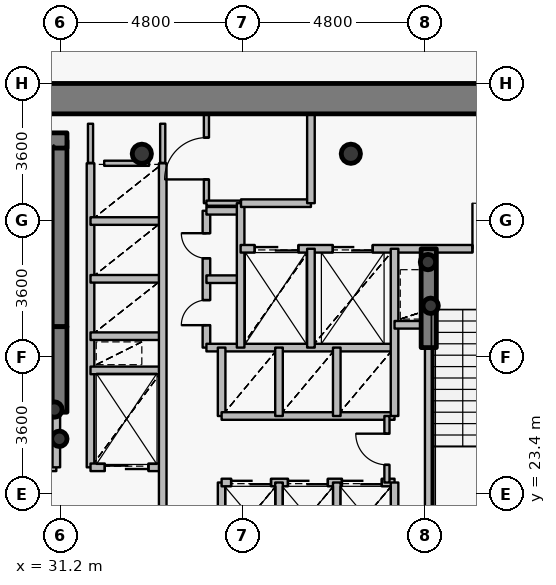
"""IFC4 building model, lengths in metres.
Left out: names, types, materials, properties, quantities, classifications, styles, units other than length and angle.
Written with IfcOpenShell. Run it as: python <this file> out.ifc"""

import sys

from ifc_helpers import new_model, si_unit, direction, frame, frame_2d, origin, origin_2d, place, context, subcontext, project, spatial, rectangle, hollow_circle, extrude, source, transform, mapped, element, fill, save


model = new_model("IFC4")
c1 = context("Model", 3, precision=1e-05, world=origin(), true_north=direction((0.0, 1.0)))
c2 = subcontext(c1, "Body", "Model", "MODEL_VIEW")
j1 = project(units=[si_unit("LENGTHUNIT", "METRE"), si_unit("PLANEANGLEUNIT", "RADIAN")], contexts=[c1])
p1 = place(None, origin())
s1 = spatial("IfcSite", under=j1, at=p1, CompositionType="ELEMENT")
p2 = place(p1, origin())
s2 = spatial("IfcBuilding", under=s1, at=p2, CompositionType="ELEMENT")
p3 = place(p2, frame((0.0, 0.0, 112.2)))
s3 = spatial("IfcBuildingStorey", under=s2, at=p3, CompositionType="ELEMENT", Elevation=112.2)
for number, where, z_axis, x_axis in (
    (1, (38.85, 32.35, 0.0), (0.0, 0.0, 1.0), (1.0, 0.0, 0.0)),
    (2, (33.35, 32.35, 0.0), (0.0, 0.0, 1.0), (1.0, 0.0, 0.0)),
):
    element("IfcColumn", number, at=place(p3, frame(where, z_axis=z_axis, x_axis=x_axis)), inside=s3, PredefinedType="COLUMN", context=c2, shape_type="SweptSolid", body=[
        extrude(hollow_circle(Radius=0.254, WallThickness=0.02, at=origin_2d()), origin(), (0.0, 0.0, 1.0), 3.75),
    ])
p4 = place(p3, frame((31.18, 27.8, 0.0), z_axis=(0.0, 0.0, 1.0), x_axis=(0.0, 1.0, 0.0)))
e3 = element("IfcWall", 3, at=p4, inside=s3, PredefinedType="SHEAR", context=c2, shape_type="SweptSolid", body=[
    extrude(rectangle(XDim=4.9, YDim=0.4, at=frame_2d((2.45, 0.0))), origin(), (0.0, 0.0, 1.0), 3.75),
])
p5 = place(p3, frame((27.28, 32.7, 0.0), z_axis=(0.0, 0.0, 1.0), x_axis=(1.0, 0.0, 0.0)))
e4 = element("IfcWall", 4, at=p5, inside=s3, PredefinedType="SHEAR", context=c2, shape_type="SweptSolid", body=[
    extrude(rectangle(XDim=4.1, YDim=0.4, at=frame_2d((2.05, 0.0))), origin(), (0.0, 0.0, 1.0), 3.75),
])
for number, where, z_axis, x_axis in (
    (5, (31.05, 25.62, 0.0), (0.0, 0.0, 1.0), (1.0, 0.0, 0.0)),
    (6, (31.18, 24.85, 0.0), (0.0, 0.0, 1.0), (1.0, 0.0, 0.0)),
    (7, (40.95, 28.35, 0.0), (0.0, 0.0, 1.0), (1.0, 0.0, 0.0)),
    (8, (40.88, 29.5, 0.0), (0.0, 0.0, 1.0), (1.0, 0.0, 0.0)),
):
    element("IfcColumn", number, at=place(p3, frame(where, z_axis=z_axis, x_axis=x_axis)), inside=s3, PredefinedType="COLUMN", context=c2, shape_type="SweptSolid", body=[
        extrude(hollow_circle(Radius=0.203, WallThickness=0.016, at=origin_2d()), origin(), (0.0, 0.0, 1.0), 3.75),
    ])
p6 = place(p3, frame((26.6, 33.8, 0.0), z_axis=(0.0, 0.0, 1.0), x_axis=(1.0, 0.0, 0.0)))
e9 = element("IfcWall", 9, at=p6, inside=s3, PredefinedType="SHEAR", context=c2, shape_type="SweptSolid", body=[
    extrude(rectangle(XDim=18.8, YDim=0.8, at=frame_2d((9.4, 0.0))), origin(), (0.0, 0.0, 1.0), 2.95),
])
p7 = place(p3, frame((31.18, 25.55, 0.0), z_axis=(0.0, 0.0, 1.0), x_axis=(0.0, 1.0, 0.0)))
e10 = element("IfcWall", 10, at=p7, inside=s3, PredefinedType="SHEAR", context=c2, shape_type="SweptSolid", body=[
    extrude(rectangle(XDim=2.25, YDim=0.4, at=frame_2d((1.125, 0.0))), origin(), (0.0, 0.0, 1.0), 3.1),
])
p8 = place(p3, frame((40.9, 27.25, 0.0), z_axis=(0.0, 0.0, 1.0), x_axis=(0.0, 1.0, 0.0)))
e11 = element("IfcWall", 11, at=p8, inside=s3, PredefinedType="SHEAR", context=c2, shape_type="SweptSolid", body=[
    extrude(rectangle(XDim=2.6, YDim=0.4, at=frame_2d((1.3, 0.0))), origin(), (0.0, 0.0, 1.0), 3.1),
])
p9 = place(p3, frame((27.56, 24.1, 0.0), z_axis=(0.0, 0.0, 1.0), x_axis=(1.0, 0.0, 0.0)))
e12 = element("IfcWall", 12, at=p9, inside=s3, PredefinedType="PARTITIONING", context=c2, shape_type="SweptSolid", body=[
    extrude(rectangle(XDim=3.54, YDim=0.2, at=frame_2d((1.77, 0.0))), origin(), (0.0, 0.0, 1.0), 3.5),
])
p10 = place(p9, frame((1.17, 0.0, 0.0)))
e13 = element("IfcOpeningElement", 13, at=p10, cuts=e12, PredefinedType="OPENING", context=c2, shape_type="SweptSolid", body=[
    extrude(rectangle(XDim=1.2, YDim=2.15, at=origin_2d()), frame((0.6, 0.11, 1.075), z_axis=(0.0, -1.0, 0.0), x_axis=(1.0, 0.0, 0.0)), (0.0, 0.0, 1.0), 0.22),
])
p11 = place(p3, frame((31.1, 24.1, 0.0), z_axis=(0.0, 0.0, 1.0), x_axis=(0.0, 1.0, 0.0)))
e14 = element("IfcWall", 14, at=p11, inside=s3, PredefinedType="PARTITIONING", context=c2, shape_type="SweptSolid", body=[
    extrude(rectangle(XDim=1.44, YDim=0.2, at=frame_2d((0.72, 0.0))), origin(), (0.0, 0.0, 1.0), 3.5),
])
p12 = place(p3, frame((32.0, 24.1, 0.0), z_axis=(0.0, 0.0, 1.0), x_axis=(0.0, 1.0, 0.0)))
e15 = element("IfcWall", 15, at=p12, inside=s3, PredefinedType="PARTITIONING", context=c2, shape_type="SweptSolid", body=[
    extrude(rectangle(XDim=8.0, YDim=0.2, at=frame_2d((4.0, 0.0))), origin(), (0.0, 0.0, 1.0), 3.5),
])
p13 = place(p3, frame((32.0, 24.1, 0.0), z_axis=(0.0, 0.0, 1.0), x_axis=(1.0, 0.0, 0.0)))
e16 = element("IfcWall", 16, at=p13, inside=s3, PredefinedType="PARTITIONING", context=c2, shape_type="SweptSolid", body=[
    extrude(rectangle(XDim=1.9, YDim=0.2, at=frame_2d((0.95, 0.0))), origin(), (0.0, 0.0, 1.0), 3.085),
])
p14 = place(p13, frame((0.375, 0.0, 0.0)))
e17 = element("IfcOpeningElement", 17, at=p14, cuts=e16, PredefinedType="OPENING", context=c2, shape_type="SweptSolid", body=[
    extrude(rectangle(XDim=1.15, YDim=2.15, at=origin_2d()), frame((0.575, 0.11, 1.075), z_axis=(0.0, -1.0, 0.0), x_axis=(1.0, 0.0, 0.0)), (0.0, 0.0, 1.0), 0.22),
])
for number, where, z_axis, x_axis in (
    (18, (32.0, 26.65, 0.0), (0.0, 0.0, 1.0), (1.0, 0.0, 0.0)),
    (19, (32.0, 27.55, 0.0), (0.0, 0.0, 1.0), (1.0, 0.0, 0.0)),
    (20, (32.0, 29.06, 0.0), (0.0, 0.0, 1.0), (1.0, 0.0, 0.0)),
    (21, (32.0, 30.58, 0.0), (0.0, 0.0, 1.0), (1.0, 0.0, 0.0)),
):
    element("IfcWall", number, at=place(p3, frame(where, z_axis=z_axis, x_axis=x_axis)), inside=s3, PredefinedType="PARTITIONING", context=c2, shape_type="SweptSolid", body=[
        extrude(rectangle(XDim=1.9, YDim=0.2, at=frame_2d((0.95, 0.0))), origin(), (0.0, 0.0, 1.0), 3.085),
    ])
p15 = place(p3, frame((33.9, 20.6, 0.0), z_axis=(0.0, 0.0, 1.0), x_axis=(0.0, 1.0, 0.0)))
e22 = element("IfcWall", 22, at=p15, inside=s3, PredefinedType="PARTITIONING", context=c2, shape_type="SweptSolid", body=[
    extrude(rectangle(XDim=11.5, YDim=0.2, at=frame_2d((5.75, 0.0))), origin(), (0.0, 0.0, 1.0), 3.085),
])
p16 = place(p3, frame((35.05, 27.25, 0.0), z_axis=(0.0, 0.0, 1.0), x_axis=(0.0, 1.0, 0.0)))
e23 = element("IfcWall", 23, at=p16, inside=s3, PredefinedType="PARTITIONING", context=c2, shape_type="SweptSolid", body=[
    extrude(rectangle(XDim=3.6, YDim=0.2, at=frame_2d((1.8, 0.0))), origin(), (0.0, 0.0, 1.0), 3.5),
])
p17 = place(p16, frame((0.59, 0.0, 0.0)))
e24 = element("IfcOpeningElement", 24, at=p17, cuts=e23, PredefinedType="OPENING", context=c2, shape_type="SweptSolid", body=[
    extrude(rectangle(XDim=0.66, YDim=2.05, at=origin_2d()), frame((0.33, 0.11, 1.025), z_axis=(0.0, -1.0, 0.0), x_axis=(1.0, 0.0, 0.0)), (0.0, 0.0, 1.0), 0.22),
])
p18 = place(p16, frame((2.35, 0.0, 0.0)))
e25 = element("IfcOpeningElement", 25, at=p18, cuts=e23, PredefinedType="OPENING", context=c2, shape_type="SweptSolid", body=[
    extrude(rectangle(XDim=0.66, YDim=2.05, at=origin_2d()), frame((0.33, 0.11, 1.025), z_axis=(0.0, -1.0, 0.0), x_axis=(1.0, 0.0, 0.0)), (0.0, 0.0, 1.0), 0.22),
])
p19 = place(p3, frame((35.05, 27.25, 0.0), z_axis=(0.0, 0.0, 1.0), x_axis=(1.0, 0.0, 0.0)))
e26 = element("IfcWall", 26, at=p19, inside=s3, PredefinedType="PARTITIONING", context=c2, shape_type="SweptSolid", body=[
    extrude(rectangle(XDim=4.95, YDim=0.2, at=frame_2d((2.475, 0.0))), origin(), (0.0, 0.0, 1.0), 3.085),
])
for number, where, z_axis, x_axis in (
    (27, (35.05, 29.05, 0.0), (0.0, 0.0, 1.0), (1.0, 0.0, 0.0)),
    (28, (35.05, 30.85, 0.0), (0.0, 0.0, 1.0), (1.0, 0.0, 0.0)),
):
    element("IfcWall", number, at=place(p3, frame(where, z_axis=z_axis, x_axis=x_axis)), inside=s3, PredefinedType="PARTITIONING", context=c2, shape_type="SweptSolid", body=[
        extrude(rectangle(XDim=0.9, YDim=0.2, at=frame_2d((0.45, 0.0))), origin(), (0.0, 0.0, 1.0), 3.5),
    ])
p20 = place(p3, frame((35.05, 31.05, 0.0), z_axis=(0.0, 0.0, 1.0), x_axis=(0.0, 1.0, 0.0)))
e29 = element("IfcWall", 29, at=p20, inside=s3, PredefinedType="PARTITIONING", context=c2, shape_type="SweptSolid", body=[
    extrude(rectangle(XDim=2.35, YDim=0.135, at=frame_2d((1.175, 0.0))), origin(), (0.0, 0.0, 1.0), 3.085),
])
p21 = place(p20, frame((0.625, 0.0, 0.0)))
e30 = element("IfcOpeningElement", 30, at=p21, cuts=e29, PredefinedType="OPENING", context=c2, shape_type="SweptSolid", body=[
    extrude(rectangle(XDim=1.1, YDim=2.15, at=origin_2d()), frame((0.55, 0.078, 1.075), z_axis=(0.0, -1.0, 0.0), x_axis=(1.0, 0.0, 0.0)), (0.0, 0.0, 1.0), 0.155),
])
p22 = place(p3, frame((35.05, 31.05, 0.0), z_axis=(0.0, 0.0, 1.0), x_axis=(1.0, 0.0, 0.0)))
e31 = element("IfcWall", 31, at=p22, inside=s3, PredefinedType="PARTITIONING", context=c2, shape_type="SweptSolid", body=[
    extrude(rectangle(XDim=0.9, YDim=0.135, at=frame_2d((0.45, 0.0))), origin(), (0.0, 0.0, 1.0), 3.5),
])
p23 = place(p3, frame((35.45, 21.9, 0.0), z_axis=(0.0, 0.0, 1.0), x_axis=(0.0, 1.0, 0.0)))
e32 = element("IfcWall", 32, at=p23, inside=s3, PredefinedType="PARTITIONING", context=c2, shape_type="SweptSolid", body=[
    extrude(rectangle(XDim=1.8, YDim=0.2, at=frame_2d((0.9, 0.0))), origin(), (0.0, 0.0, 1.0), 3.5),
])
p24 = place(p3, frame((35.45, 23.7, 0.0), z_axis=(0.0, 0.0, 1.0), x_axis=(1.0, 0.0, 0.0)))
e33 = element("IfcWall", 33, at=p24, inside=s3, PredefinedType="PARTITIONING", context=c2, shape_type="SweptSolid", body=[
    extrude(rectangle(XDim=4.55, YDim=0.2, at=frame_2d((2.275, 0.0))), origin(), (0.0, 0.0, 1.0), 3.085),
])
p25 = place(p24, frame((0.25, 0.0, 0.0)))
e34 = element("IfcOpeningElement", 34, at=p25, cuts=e33, PredefinedType="OPENING", context=c2, shape_type="SweptSolid", body=[
    extrude(rectangle(XDim=1.05, YDim=2.15, at=origin_2d()), frame((0.525, 0.11, 1.075), z_axis=(0.0, -1.0, 0.0), x_axis=(1.0, 0.0, 0.0)), (0.0, 0.0, 1.0), 0.22),
])
p26 = place(p24, frame((1.745, 0.0, 0.0)))
e35 = element("IfcOpeningElement", 35, at=p26, cuts=e33, PredefinedType="OPENING", context=c2, shape_type="SweptSolid", body=[
    extrude(rectangle(XDim=1.05, YDim=2.15, at=origin_2d()), frame((0.525, 0.11, 1.075), z_axis=(0.0, -1.0, 0.0), x_axis=(1.0, 0.0, 0.0)), (0.0, 0.0, 1.0), 0.22),
])
p27 = place(p24, frame((3.165, 0.0, 0.0)))
e36 = element("IfcOpeningElement", 36, at=p27, cuts=e33, PredefinedType="OPENING", context=c2, shape_type="SweptSolid", body=[
    extrude(rectangle(XDim=1.05, YDim=2.15, at=origin_2d()), frame((0.525, 0.11, 1.075), z_axis=(0.0, -1.0, 0.0), x_axis=(1.0, 0.0, 0.0)), (0.0, 0.0, 1.0), 0.22),
])
p28 = place(p3, frame((35.45, 25.45, 0.0), z_axis=(0.0, 0.0, 1.0), x_axis=(0.0, 1.0, 0.0)))
e37 = element("IfcWall", 37, at=p28, inside=s3, PredefinedType="PARTITIONING", context=c2, shape_type="SweptSolid", body=[
    extrude(rectangle(XDim=1.8, YDim=0.2, at=frame_2d((0.9, 0.0))), origin(), (0.0, 0.0, 1.0), 3.5),
])
p29 = place(p3, frame((35.45, 25.45, 0.0), z_axis=(0.0, 0.0, 1.0), x_axis=(1.0, 0.0, 0.0)))
e38 = element("IfcWall", 38, at=p29, inside=s3, PredefinedType="PARTITIONING", context=c2, shape_type="SweptSolid", body=[
    extrude(rectangle(XDim=4.55, YDim=0.2, at=frame_2d((2.275, 0.0))), origin(), (0.0, 0.0, 1.0), 3.085),
])
p30 = place(p3, frame((35.95, 27.25, 0.0), z_axis=(0.0, 0.0, 1.0), x_axis=(0.0, 1.0, 0.0)))
e39 = element("IfcWall", 39, at=p30, inside=s3, PredefinedType="PARTITIONING", context=c2, shape_type="SweptSolid", body=[
    extrude(rectangle(XDim=3.8, YDim=0.2, at=frame_2d((1.9, 0.0))), origin(), (0.0, 0.0, 1.0), 3.5),
])
p31 = place(p3, frame((35.95, 29.85, 0.0), z_axis=(0.0, 0.0, 1.0), x_axis=(1.0, 0.0, 0.0)))
e40 = element("IfcWall", 40, at=p31, inside=s3, PredefinedType="PARTITIONING", context=c2, shape_type="SweptSolid", body=[
    extrude(rectangle(XDim=8.49, YDim=0.2, at=frame_2d((4.245, 0.0))), origin(), (0.0, 0.0, 1.0), 3.085),
])
p32 = place(p31, frame((6.1, 0.0, 0.0)))
e41 = element("IfcOpeningElement", 41, at=p32, cuts=e40, PredefinedType="OPENING", context=c2, shape_type="SweptSolid", body=[
    extrude(rectangle(XDim=1.2, YDim=2.15, at=origin_2d()), frame((0.6, 0.11, 1.075), z_axis=(0.0, -1.0, 0.0), x_axis=(1.0, 0.0, 0.0)), (0.0, 0.0, 1.0), 0.22),
])
p33 = place(p31, frame((0.37, 0.0, 0.0)))
e42 = element("IfcOpeningElement", 42, at=p33, cuts=e40, PredefinedType="OPENING", context=c2, shape_type="SweptSolid", body=[
    extrude(rectangle(XDim=1.15, YDim=2.15, at=origin_2d()), frame((0.575, 0.11, 1.075), z_axis=(0.0, -1.0, 0.0), x_axis=(1.0, 0.0, 0.0)), (0.0, 0.0, 1.0), 0.22),
])
p34 = place(p31, frame((2.425, 0.0, 0.0)))
e43 = element("IfcOpeningElement", 43, at=p34, cuts=e40, PredefinedType="OPENING", context=c2, shape_type="SweptSolid", body=[
    extrude(rectangle(XDim=1.05, YDim=2.15, at=origin_2d()), frame((0.525, 0.11, 1.075), z_axis=(0.0, -1.0, 0.0), x_axis=(1.0, 0.0, 0.0)), (0.0, 0.0, 1.0), 0.22),
])
p35 = place(p3, frame((35.96, 31.05, 0.0), z_axis=(0.0, 0.0, 1.0), x_axis=(1.0, 0.0, 0.0)))
e44 = element("IfcWall", 44, at=p35, inside=s3, PredefinedType="PARTITIONING", context=c2, shape_type="SweptSolid", body=[
    extrude(rectangle(XDim=1.84, YDim=0.2, at=frame_2d((0.92, 0.0))), origin(), (0.0, 0.0, 1.0), 3.5),
])
for number, where, z_axis, x_axis in (
    (45, (36.96, 21.9, 0.0), (0.0, 0.0, 1.0), (0.0, 1.0, 0.0)),
    (46, (36.96, 25.45, 0.0), (0.0, 0.0, 1.0), (0.0, 1.0, 0.0)),
):
    element("IfcWall", number, at=place(p3, frame(where, z_axis=z_axis, x_axis=x_axis)), inside=s3, PredefinedType="PARTITIONING", context=c2, shape_type="SweptSolid", body=[
        extrude(rectangle(XDim=1.8, YDim=0.2, at=frame_2d((0.9, 0.0))), origin(), (0.0, 0.0, 1.0), 3.5),
    ])
p36 = place(p3, frame((37.8, 27.25, 0.0), z_axis=(0.0, 0.0, 1.0), x_axis=(0.0, 1.0, 0.0)))
e47 = element("IfcWall", 47, at=p36, inside=s3, PredefinedType="PARTITIONING", context=c2, shape_type="SweptSolid", body=[
    extrude(rectangle(XDim=2.6, YDim=0.2, at=frame_2d((1.3, 0.0))), origin(), (0.0, 0.0, 1.0), 3.5),
])
p37 = place(p3, frame((37.8, 31.05, 0.0), z_axis=(0.0, 0.0, 1.0), x_axis=(0.0, 1.0, 0.0)))
e48 = element("IfcWall", 48, at=p37, inside=s3, PredefinedType="PARTITIONING", context=c2, shape_type="SweptSolid", body=[
    extrude(rectangle(XDim=2.35, YDim=0.2, at=frame_2d((1.175, 0.0))), origin(), (0.0, 0.0, 1.0), 3.085),
])
for number, where, z_axis, x_axis in (
    (49, (38.48, 21.9, 0.0), (0.0, 0.0, 1.0), (0.0, 1.0, 0.0)),
    (50, (38.48, 25.45, 0.0), (0.0, 0.0, 1.0), (0.0, 1.0, 0.0)),
):
    element("IfcWall", number, at=place(p3, frame(where, z_axis=z_axis, x_axis=x_axis)), inside=s3, PredefinedType="PARTITIONING", context=c2, shape_type="SweptSolid", body=[
        extrude(rectangle(XDim=1.8, YDim=0.2, at=frame_2d((0.9, 0.0))), origin(), (0.0, 0.0, 1.0), 3.5),
    ])
p38 = place(p3, frame((39.8, 23.7, 0.0), z_axis=(0.0, 0.0, 1.0), x_axis=(0.0, 1.0, 0.0)))
e51 = element("IfcWall", 51, at=p38, inside=s3, PredefinedType="PARTITIONING", context=c2, shape_type="SweptSolid", body=[
    extrude(rectangle(XDim=1.75, YDim=0.135, at=frame_2d((0.875, 0.0))), origin(), (0.0, 0.0, 1.0), 3.5),
])
p39 = place(p38, frame((0.465, 0.0, 0.0)))
e52 = element("IfcOpeningElement", 52, at=p39, cuts=e51, PredefinedType="OPENING", context=c2, shape_type="SweptSolid", body=[
    extrude(rectangle(XDim=0.82, YDim=2.1, at=origin_2d()), frame((0.41, 0.078, 1.05), z_axis=(0.0, -1.0, 0.0), x_axis=(1.0, 0.0, 0.0)), (0.0, 0.0, 1.0), 0.155),
])
p40 = place(p3, frame((40.0, 21.9, 0.0), z_axis=(0.0, 0.0, 1.0), x_axis=(0.0, 1.0, 0.0)))
e53 = element("IfcWall", 53, at=p40, inside=s3, PredefinedType="PARTITIONING", context=c2, shape_type="SweptSolid", body=[
    extrude(rectangle(XDim=1.8, YDim=0.2, at=frame_2d((0.9, 0.0))), origin(), (0.0, 0.0, 1.0), 3.5),
])
p41 = place(p3, frame((40.0, 25.45, 0.0), z_axis=(0.0, 0.0, 1.0), x_axis=(0.0, 1.0, 0.0)))
e54 = element("IfcWall", 54, at=p41, inside=s3, PredefinedType="PARTITIONING", context=c2, shape_type="SweptSolid", body=[
    extrude(rectangle(XDim=4.4, YDim=0.2, at=frame_2d((2.2, 0.0))), origin(), (0.0, 0.0, 1.0), 3.5),
])
p42 = place(p3, frame((40.0, 27.85, 0.0), z_axis=(0.0, 0.0, 1.0), x_axis=(1.0, 0.0, 0.0)))
e55 = element("IfcWall", 55, at=p42, inside=s3, PredefinedType="PARTITIONING", context=c2, shape_type="SweptSolid", body=[
    extrude(rectangle(XDim=0.9, YDim=0.2, at=frame_2d((0.45, 0.0))), origin(), (0.0, 0.0, 1.0), 3.5),
])
p43 = place(p3, frame((40.9, 21.33, 0.0), z_axis=(0.0, 0.0, 1.0), x_axis=(0.0, 1.0, 0.0)))
e56 = element("IfcWall", 56, at=p43, inside=s3, PredefinedType="PARTITIONING", context=c2, shape_type="SweptSolid", body=[
    extrude(rectangle(XDim=5.91, YDim=0.2, at=frame_2d((2.955, 0.0))), origin(), (0.0, 0.0, 1.0), 3.035),
])
p44 = place(p3, frame((32.36, 32.1, 0.0), z_axis=(0.0, 0.0, 1.0), x_axis=(1.0, 0.0, 0.0)))
e57 = element("IfcWall", 57, at=p44, inside=s3, PredefinedType="PARTITIONING", context=c2, shape_type="SweptSolid", body=[
    extrude(rectangle(XDim=1.18, YDim=0.135, at=frame_2d((0.59, 0.0))), origin(), (0.0, 0.0, 1.0), 3.085),
])
p45 = place(p3, frame((32.0, 33.14, 0.0), z_axis=(0.0, 0.0, 1.0), x_axis=(0.0, -1.0, 0.0)))
e58 = element("IfcWall", 58, at=p45, inside=s3, PredefinedType="PARTITIONING", context=c2, shape_type="SweptSolid", body=[
    extrude(rectangle(XDim=1.03, YDim=0.135, at=frame_2d((0.515, 0.0))), origin(), (0.0, 0.0, 1.0), 3.035),
])
p46 = place(p3, frame((33.9, 32.11, 0.0), z_axis=(0.0, 0.0, 1.0), x_axis=(0.0, 1.0, 0.0)))
e59 = element("IfcWall", 59, at=p46, inside=s3, PredefinedType="PARTITIONING", context=c2, shape_type="SweptSolid", body=[
    extrude(rectangle(XDim=1.03, YDim=0.135, at=frame_2d((0.515, 0.0))), origin(), (0.0, 0.0, 1.0), 3.085),
])
m1 = source(origin(), c2, "Body", "SweptSolid", [
    extrude(rectangle(XDim=1.2, YDim=2.15, at=origin_2d()), frame((0.6, 0.025, 1.075), z_axis=(0.0, -1.0, 0.0), x_axis=(1.0, 0.0, 0.0)), (0.0, 0.0, 1.0), 0.05),
])
p47 = place(p32, origin())
e60 = element("IfcDoor", 60, at=p47, inside=s3, OperationType="SINGLE_SWING_LEFT", PredefinedType="DOOR", context=c2, shape_type="MappedRepresentation", body=[
    mapped(m1, transform((0.0, 0.0, 0.0), x_axis=(1.0, 0.0, 0.0), y_axis=(0.0, 1.0, 0.0), z_axis=(0.0, 0.0, 1.0), scale=1.0)),
])
fill(e41, e60)
m2 = source(origin(), c2, "Body", "SweptSolid", [
    extrude(rectangle(XDim=1.15, YDim=2.15, at=origin_2d()), frame((0.575, 0.025, 1.075), z_axis=(0.0, -1.0, 0.0), x_axis=(1.0, 0.0, 0.0)), (0.0, 0.0, 1.0), 0.05),
])
p48 = place(p33, origin())
e61 = element("IfcDoor", 61, at=p48, inside=s3, OperationType="DOUBLE_DOOR_SLIDING", PredefinedType="USERDEFINED", context=c2, shape_type="MappedRepresentation", body=[
    mapped(m2, transform((0.0, 0.0, 0.0), x_axis=(1.0, 0.0, 0.0), y_axis=(0.0, 1.0, 0.0), z_axis=(0.0, 0.0, 1.0), scale=1.0)),
])
fill(e42, e61)
p49 = place(p14, origin())
e62 = element("IfcDoor", 62, at=p49, inside=s3, OperationType="DOUBLE_DOOR_SLIDING", PredefinedType="USERDEFINED", context=c2, shape_type="MappedRepresentation", body=[
    mapped(m2, transform((0.0, 0.0, 0.0), x_axis=(1.0, 0.0, 0.0), y_axis=(0.0, 1.0, 0.0), z_axis=(0.0, 0.0, 1.0), scale=1.0)),
])
fill(e17, e62)
m3 = source(origin(), c2, "Body", "SweptSolid", [
    extrude(rectangle(XDim=1.05, YDim=2.15, at=origin_2d()), frame((0.525, 0.025, 1.075), z_axis=(0.0, -1.0, 0.0), x_axis=(1.0, 0.0, 0.0)), (0.0, 0.0, 1.0), 0.05),
])
p50 = place(p34, origin())
e63 = element("IfcDoor", 63, at=p50, inside=s3, OperationType="DOUBLE_DOOR_SLIDING", PredefinedType="USERDEFINED", context=c2, shape_type="MappedRepresentation", body=[
    mapped(m3, transform((0.0, 0.0, 0.0), x_axis=(1.0, 0.0, 0.0), y_axis=(0.0, 1.0, 0.0), z_axis=(0.0, 0.0, 1.0), scale=1.0)),
])
fill(e43, e63)
p51 = place(p25, origin())
e64 = element("IfcDoor", 64, at=p51, inside=s3, OperationType="DOUBLE_DOOR_SLIDING", PredefinedType="USERDEFINED", context=c2, shape_type="MappedRepresentation", body=[
    mapped(m3, transform((0.0, 0.0, 0.0), x_axis=(1.0, 0.0, 0.0), y_axis=(0.0, 1.0, 0.0), z_axis=(0.0, 0.0, 1.0), scale=1.0)),
])
fill(e34, e64)
p52 = place(p26, origin())
e65 = element("IfcDoor", 65, at=p52, inside=s3, OperationType="DOUBLE_DOOR_SLIDING", PredefinedType="USERDEFINED", context=c2, shape_type="MappedRepresentation", body=[
    mapped(m3, transform((0.0, 0.0, 0.0), x_axis=(1.0, 0.0, 0.0), y_axis=(0.0, 1.0, 0.0), z_axis=(0.0, 0.0, 1.0), scale=1.0)),
])
fill(e35, e65)
p53 = place(p27, origin())
e66 = element("IfcDoor", 66, at=p53, inside=s3, OperationType="DOUBLE_DOOR_SLIDING", PredefinedType="USERDEFINED", context=c2, shape_type="MappedRepresentation", body=[
    mapped(m3, transform((0.0, 0.0, 0.0), x_axis=(1.0, 0.0, 0.0), y_axis=(0.0, 1.0, 0.0), z_axis=(0.0, 0.0, 1.0), scale=1.0)),
])
fill(e36, e66)
m4 = source(origin(), c2, "Body", "SweptSolid", [
    extrude(rectangle(XDim=0.66, YDim=2.05, at=origin_2d()), frame((0.33, 0.025, 1.025), z_axis=(0.0, -1.0, 0.0), x_axis=(1.0, 0.0, 0.0)), (0.0, 0.0, 1.0), 0.05),
])
p54 = place(p17, origin())
e67 = element("IfcDoor", 67, at=p54, inside=s3, OperationType="SINGLE_SWING_LEFT", PredefinedType="USERDEFINED", context=c2, shape_type="MappedRepresentation", body=[
    mapped(m4, transform((0.0, 0.0, 0.0), x_axis=(1.0, 0.0, 0.0), y_axis=(0.0, 1.0, 0.0), z_axis=(0.0, 0.0, 1.0), scale=1.0)),
])
fill(e24, e67)
p55 = place(p18, origin())
e68 = element("IfcDoor", 68, at=p55, inside=s3, OperationType="SINGLE_SWING_RIGHT", PredefinedType="USERDEFINED", context=c2, shape_type="MappedRepresentation", body=[
    mapped(m4, transform((0.0, 0.0, 0.0), x_axis=(1.0, 0.0, 0.0), y_axis=(0.0, 1.0, 0.0), z_axis=(0.0, 0.0, 1.0), scale=1.0)),
])
fill(e25, e68)
m5 = source(origin(), c2, "Body", "SweptSolid", [
    extrude(rectangle(XDim=1.1, YDim=2.15, at=origin_2d()), frame((0.55, 0.025, 1.075), z_axis=(0.0, -1.0, 0.0), x_axis=(1.0, 0.0, 0.0)), (0.0, 0.0, 1.0), 0.05),
])
p56 = place(p21, origin())
e69 = element("IfcDoor", 69, at=p56, inside=s3, OperationType="SINGLE_SWING_LEFT", PredefinedType="DOOR", context=c2, shape_type="MappedRepresentation", body=[
    mapped(m5, transform((0.0, 0.0, 0.0), x_axis=(1.0, 0.0, 0.0), y_axis=(0.0, 1.0, 0.0), z_axis=(0.0, 0.0, 1.0), scale=1.0)),
])
fill(e30, e69)
m6 = source(origin(), c2, "Body", "SweptSolid", [
    extrude(rectangle(XDim=0.82, YDim=2.1, at=origin_2d()), frame((0.41, 0.025, 1.05), z_axis=(0.0, -1.0, 0.0), x_axis=(1.0, 0.0, 0.0)), (0.0, 0.0, 1.0), 0.05),
])
p57 = place(p39, origin())
e70 = element("IfcDoor", 70, at=p57, inside=s3, OperationType="SINGLE_SWING_RIGHT", PredefinedType="DOOR", context=c2, shape_type="MappedRepresentation", body=[
    mapped(m6, transform((0.0, 0.0, 0.0), x_axis=(1.0, 0.0, 0.0), y_axis=(0.0, 1.0, 0.0), z_axis=(0.0, 0.0, 1.0), scale=1.0)),
])
fill(e52, e70)
save(model, sys.argv[1])
